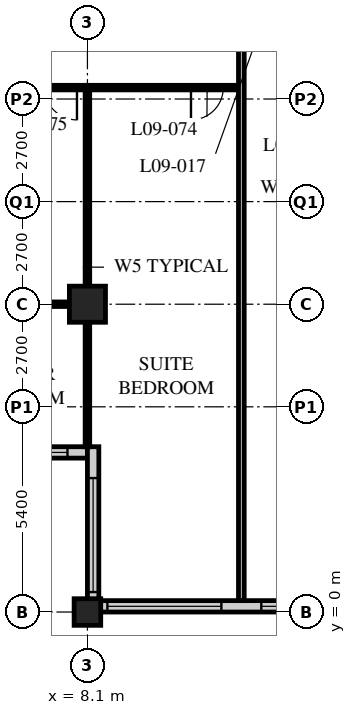
"""IFC4 building model, lengths in metres.
Left out: names, types, materials, properties, quantities, classifications, styles, units other than length and angle.
Written with IfcOpenShell. Run it as: python <this file> out.ifc"""

import sys

from ifc_helpers import new_model, si_unit, direction, frame, frame_2d, origin, origin_2d, place, context, subcontext, project, spatial, rectangle, hollow_rectangle, extrude, element, fill, save


model = new_model("IFC4")
c1 = context("Model", 3, precision=1e-05, world=origin(), true_north=direction((0.0, 1.0)))
c2 = subcontext(c1, "Body", "Model", "MODEL_VIEW")
j1 = project(units=[si_unit("LENGTHUNIT", "METRE"), si_unit("PLANEANGLEUNIT", "RADIAN")], contexts=[c1])
p1 = place(None, origin())
s1 = spatial("IfcSite", under=j1, at=p1, CompositionType="ELEMENT")
p2 = place(p1, origin())
s2 = spatial("IfcBuilding", under=s1, at=p2, CompositionType="ELEMENT")
p3 = place(p2, frame((0.0, 0.0, 43.2)))
s3 = spatial("IfcBuildingStorey", under=s2, at=p3, CompositionType="ELEMENT", Elevation=43.2)
p4 = place(p3, frame((8.1, 0.0, 0.0), z_axis=(0.0, 0.0, 1.0), x_axis=(1.0, 0.0, 0.0)))
e1 = element("IfcColumn", 1, at=p4, inside=s3, PredefinedType="COLUMN", context=c2, shape_type="SweptSolid", body=[
    extrude(hollow_rectangle(XDim=0.7, YDim=0.7, WallThickness=0.06, at=origin_2d()), origin(), (0.0, 0.0, 1.0), 3.4),
])
p5 = place(p3, frame((8.1, 8.1, 0.0), z_axis=(0.0, 0.0, 1.0), x_axis=(1.0, 0.0, 0.0)))
e2 = element("IfcColumn", 2, at=p5, inside=s3, PredefinedType="COLUMN", context=c2, shape_type="SweptSolid", body=[
    extrude(hollow_rectangle(XDim=0.95, YDim=0.95, WallThickness=0.095, at=origin_2d()), origin(), (0.0, 0.0, 1.0), 3.4),
])
p6 = place(p3, frame((8.4, 0.15, 0.0), z_axis=(0.0, 0.0, 1.0), x_axis=(1.0, 0.0, 0.0)))
e3 = element("IfcWall", 3, at=p6, inside=s3, PredefinedType="SOLIDWALL", context=c2, shape_type="SweptSolid", body=[
    extrude(rectangle(XDim=40.2, YDim=0.3, at=frame_2d((20.1, 0.0))), origin(), (0.0, 0.0, 1.0), 3.19),
])
p7 = place(p6, frame((0.225, 0.0, 0.9)))
e4 = element("IfcOpeningElement", 4, at=p7, cuts=e3, PredefinedType="OPENING", context=c2, shape_type="SweptSolid", body=[
    extrude(rectangle(XDim=3.0, YDim=2.0, at=frame_2d((1.5, 1.0))), frame((0.0, 0.16, 0.0), z_axis=(0.0, -1.0, 0.0), x_axis=(1.0, 0.0, 0.0)), (0.0, 0.0, 1.0), 0.32),
])
p8 = place(p6, frame((4.275, 0.0, 0.9)))
e5 = element("IfcOpeningElement", 5, at=p8, cuts=e3, PredefinedType="OPENING", context=c2, shape_type="SweptSolid", body=[
    extrude(rectangle(XDim=3.0, YDim=2.0, at=frame_2d((1.5, 1.0))), frame((0.0, 0.16, 0.0), z_axis=(0.0, -1.0, 0.0), x_axis=(1.0, 0.0, 0.0)), (0.0, 0.0, 1.0), 0.32),
])
p9 = place(p6, frame((8.325, 0.0, 0.9)))
e6 = element("IfcOpeningElement", 6, at=p9, cuts=e3, PredefinedType="OPENING", context=c2, shape_type="SweptSolid", body=[
    extrude(rectangle(XDim=3.0, YDim=2.0, at=frame_2d((1.5, 1.0))), frame((0.0, 0.16, 0.0), z_axis=(0.0, -1.0, 0.0), x_axis=(1.0, 0.0, 0.0)), (0.0, 0.0, 1.0), 0.32),
])
p10 = place(p6, frame((12.375, 0.0, 0.9)))
e7 = element("IfcOpeningElement", 7, at=p10, cuts=e3, PredefinedType="OPENING", context=c2, shape_type="SweptSolid", body=[
    extrude(rectangle(XDim=3.0, YDim=2.0, at=frame_2d((1.5, 1.0))), frame((0.0, 0.16, 0.0), z_axis=(0.0, -1.0, 0.0), x_axis=(1.0, 0.0, 0.0)), (0.0, 0.0, 1.0), 0.32),
])
p11 = place(p6, frame((16.425, 0.0, 0.9)))
e8 = element("IfcOpeningElement", 8, at=p11, cuts=e3, PredefinedType="OPENING", context=c2, shape_type="SweptSolid", body=[
    extrude(rectangle(XDim=3.0, YDim=2.0, at=frame_2d((1.5, 1.0))), frame((0.0, 0.16, 0.0), z_axis=(0.0, -1.0, 0.0), x_axis=(1.0, 0.0, 0.0)), (0.0, 0.0, 1.0), 0.32),
])
p12 = place(p6, frame((20.475, 0.0, 0.9)))
e9 = element("IfcOpeningElement", 9, at=p12, cuts=e3, PredefinedType="OPENING", context=c2, shape_type="SweptSolid", body=[
    extrude(rectangle(XDim=3.0, YDim=2.0, at=frame_2d((1.5, 1.0))), frame((0.0, 0.16, 0.0), z_axis=(0.0, -1.0, 0.0), x_axis=(1.0, 0.0, 0.0)), (0.0, 0.0, 1.0), 0.32),
])
p13 = place(p6, frame((24.525, 0.0, 0.9)))
e10 = element("IfcOpeningElement", 10, at=p13, cuts=e3, PredefinedType="OPENING", context=c2, shape_type="SweptSolid", body=[
    extrude(rectangle(XDim=3.0, YDim=2.0, at=frame_2d((1.5, 1.0))), frame((0.0, 0.16, 0.0), z_axis=(0.0, -1.0, 0.0), x_axis=(1.0, 0.0, 0.0)), (0.0, 0.0, 1.0), 0.32),
])
p14 = place(p6, frame((28.575, 0.0, 0.9)))
e11 = element("IfcOpeningElement", 11, at=p14, cuts=e3, PredefinedType="OPENING", context=c2, shape_type="SweptSolid", body=[
    extrude(rectangle(XDim=3.0, YDim=2.0, at=frame_2d((1.5, 1.0))), frame((0.0, 0.16, 0.0), z_axis=(0.0, -1.0, 0.0), x_axis=(1.0, 0.0, 0.0)), (0.0, 0.0, 1.0), 0.32),
])
p15 = place(p6, frame((32.625, 0.0, 0.9)))
e12 = element("IfcOpeningElement", 12, at=p15, cuts=e3, PredefinedType="OPENING", context=c2, shape_type="SweptSolid", body=[
    extrude(rectangle(XDim=3.0, YDim=2.0, at=frame_2d((1.5, 1.0))), frame((0.0, 0.16, 0.0), z_axis=(0.0, -1.0, 0.0), x_axis=(1.0, 0.0, 0.0)), (0.0, 0.0, 1.0), 0.32),
])
p16 = place(p6, frame((36.675, 0.0, 0.9)))
e13 = element("IfcOpeningElement", 13, at=p16, cuts=e3, PredefinedType="OPENING", context=c2, shape_type="SweptSolid", body=[
    extrude(rectangle(XDim=3.0, YDim=2.0, at=frame_2d((1.5, 1.0))), frame((0.0, 0.16, 0.0), z_axis=(0.0, -1.0, 0.0), x_axis=(1.0, 0.0, 0.0)), (0.0, 0.0, 1.0), 0.32),
])
p17 = place(p3, frame((4.35, 4.2, 0.0), z_axis=(0.0, 0.0, 1.0), x_axis=(1.0, 0.0, 0.0)))
e14 = element("IfcWall", 14, at=p17, inside=s3, PredefinedType="SOLIDWALL", context=c2, shape_type="SweptSolid", body=[
    extrude(rectangle(XDim=3.75, YDim=0.3, at=frame_2d((1.875, 0.0))), origin(), (0.0, 0.0, 1.0), 3.19),
])
p18 = place(p17, frame((0.225, 0.0, 0.9)))
e15 = element("IfcOpeningElement", 15, at=p18, cuts=e14, PredefinedType="OPENING", context=c2, shape_type="SweptSolid", body=[
    extrude(rectangle(XDim=3.0, YDim=1.5, at=frame_2d((1.5, 0.75))), frame((0.0, 0.16, 0.0), z_axis=(0.0, -1.0, 0.0), x_axis=(1.0, 0.0, 0.0)), (0.0, 0.0, 1.0), 0.32),
])
p19 = place(p3, frame((8.25, 4.35, 0.0), z_axis=(0.0, 0.0, 1.0), x_axis=(0.0, -1.0, 0.0)))
e16 = element("IfcWall", 16, at=p19, inside=s3, PredefinedType="SOLIDWALL", context=c2, shape_type="SweptSolid", body=[
    extrude(rectangle(XDim=4.35, YDim=0.3, at=frame_2d((2.175, 0.0))), origin(), (0.0, 0.0, 1.0), 3.19),
])
p20 = place(p19, frame((0.825, 0.0, 0.9)))
e17 = element("IfcOpeningElement", 17, at=p20, cuts=e16, PredefinedType="OPENING", context=c2, shape_type="SweptSolid", body=[
    extrude(rectangle(XDim=3.0, YDim=1.5, at=frame_2d((1.5, 0.75))), frame((0.0, 0.16, 0.0), z_axis=(0.0, -1.0, 0.0), x_axis=(1.0, 0.0, 0.0)), (0.0, 0.0, 1.0), 0.32),
])
p21 = place(p3, frame((4.1, 13.8, 0.0), z_axis=(0.0, 0.0, 1.0), x_axis=(1.0, 0.0, 0.0)))
e18 = element("IfcWall", 18, at=p21, inside=s3, PredefinedType="PARTITIONING", context=c2, shape_type="SweptSolid", body=[
    extrude(rectangle(XDim=8.05, YDim=0.12, at=frame_2d((4.025, 0.0))), origin(), (0.0, 0.0, 1.0), 3.19),
])
p22 = place(p21, frame((6.725, 0.0, 0.0)))
e19 = element("IfcOpeningElement", 19, at=p22, cuts=e18, PredefinedType="OPENING", context=c2, shape_type="SweptSolid", body=[
    extrude(rectangle(XDim=0.85, YDim=2.1, at=frame_2d((0.425, 1.05))), frame((0.0, 0.07, 0.0), z_axis=(0.0, -1.0, 0.0), x_axis=(1.0, 0.0, 0.0)), (0.0, 0.0, 1.0), 0.14),
])
p23 = place(p21, frame((2.875, 0.0, 0.0)))
e20 = element("IfcOpeningElement", 20, at=p23, cuts=e18, PredefinedType="OPENING", context=c2, shape_type="SweptSolid", body=[
    extrude(rectangle(XDim=0.85, YDim=2.1, at=frame_2d((0.425, 1.05))), frame((0.0, 0.07, 0.0), z_axis=(0.0, -1.0, 0.0), x_axis=(1.0, 0.0, 0.0)), (0.0, 0.0, 1.0), 0.14),
])
p24 = place(p3, frame((8.1, 13.8, 0.0), z_axis=(0.0, 0.0, 1.0), x_axis=(0.0, -1.0, 0.0)))
e21 = element("IfcWall", 21, at=p24, inside=s3, PredefinedType="PARTITIONING", context=c2, shape_type="SweptSolid", body=[
    extrude(rectangle(XDim=9.45, YDim=0.12, at=frame_2d((4.725, 0.0))), origin(), (0.0, 0.0, 1.0), 2.578),
])
p25 = place(p3, frame((8.1, 8.1, 0.0), z_axis=(0.0, 0.0, 1.0), x_axis=(-1.0, 0.0, 0.0)))
e22 = element("IfcWall", 22, at=p25, inside=s3, PredefinedType="PARTITIONING", context=c2, shape_type="SweptSolid", body=[
    extrude(rectangle(XDim=3.75, YDim=0.12, at=frame_2d((1.875, 0.0))), origin(), (0.0, 0.0, 1.0), 2.578),
])
p26 = place(p25, frame((1.875, 0.0, 0.0)))
e23 = element("IfcOpeningElement", 23, at=p26, cuts=e22, PredefinedType="OPENING", context=c2, shape_type="SweptSolid", body=[
    extrude(rectangle(XDim=0.85, YDim=2.1, at=frame_2d((0.425, 1.05))), frame((0.0, 0.07, 0.0), z_axis=(0.0, -1.0, 0.0), x_axis=(1.0, 0.0, 0.0)), (0.0, 0.0, 1.0), 0.14),
])
p27 = place(p3, frame((12.15, 16.2, 0.0), z_axis=(0.0, 0.0, 1.0), x_axis=(0.0, -1.0, 0.0)))
e24 = element("IfcWall", 24, at=p27, inside=s3, PredefinedType="PARTITIONING", context=c2, shape_type="SweptSolid", body=[
    extrude(rectangle(XDim=15.9, YDim=0.15, at=frame_2d((7.95, 0.0))), origin(), (0.0, 0.0, 1.0), 3.19),
])
p28 = place(p7, origin())
e25 = element("IfcWindow", 25, at=p28, inside=s3, PartitioningType="SINGLE_PANEL", PredefinedType="WINDOW", context=c2, shape_type="SweptSolid", body=[
    extrude(rectangle(XDim=3.0, YDim=2.0, at=frame_2d((1.5, 1.0))), frame((0.0, 0.03, 0.0), z_axis=(0.0, -1.0, 0.0), x_axis=(1.0, 0.0, 0.0)), (0.0, 0.0, 1.0), 0.06),
])
fill(e4, e25)
p29 = place(p8, origin())
e26 = element("IfcWindow", 26, at=p29, inside=s3, PartitioningType="SINGLE_PANEL", PredefinedType="WINDOW", context=c2, shape_type="SweptSolid", body=[
    extrude(rectangle(XDim=3.0, YDim=2.0, at=frame_2d((1.5, 1.0))), frame((0.0, 0.03, 0.0), z_axis=(0.0, -1.0, 0.0), x_axis=(1.0, 0.0, 0.0)), (0.0, 0.0, 1.0), 0.06),
])
fill(e5, e26)
p30 = place(p18, origin())
e27 = element("IfcWindow", 27, at=p30, inside=s3, PartitioningType="SINGLE_PANEL", PredefinedType="WINDOW", context=c2, shape_type="SweptSolid", body=[
    extrude(rectangle(XDim=3.0, YDim=1.5, at=frame_2d((1.5, 0.75))), frame((0.0, 0.03, 0.0), z_axis=(0.0, -1.0, 0.0), x_axis=(1.0, 0.0, 0.0)), (0.0, 0.0, 1.0), 0.06),
])
fill(e15, e27)
p31 = place(p20, origin())
e28 = element("IfcWindow", 28, at=p31, inside=s3, PartitioningType="SINGLE_PANEL", PredefinedType="WINDOW", context=c2, shape_type="SweptSolid", body=[
    extrude(rectangle(XDim=3.0, YDim=1.5, at=frame_2d((1.5, 0.75))), frame((0.0, 0.03, 0.0), z_axis=(0.0, -1.0, 0.0), x_axis=(1.0, 0.0, 0.0)), (0.0, 0.0, 1.0), 0.06),
])
fill(e17, e28)
p32 = place(p22, origin())
e29 = element("IfcDoor", 29, at=p32, inside=s3, OperationType="SINGLE_SWING_RIGHT", PredefinedType="DOOR", context=c2, shape_type="SweptSolid", body=[
    extrude(rectangle(XDim=0.85, YDim=2.1, at=frame_2d((0.425, 1.05))), frame((0.0, 0.025, 0.0), z_axis=(0.0, -1.0, 0.0), x_axis=(1.0, 0.0, 0.0)), (0.0, 0.0, 1.0), 0.05),
])
fill(e19, e29)
p33 = place(p23, origin())
e30 = element("IfcDoor", 30, at=p33, inside=s3, OperationType="SINGLE_SWING_LEFT", PredefinedType="DOOR", context=c2, shape_type="SweptSolid", body=[
    extrude(rectangle(XDim=0.85, YDim=2.1, at=frame_2d((0.425, 1.05))), frame((0.0, 0.025, 0.0), z_axis=(0.0, -1.0, 0.0), x_axis=(1.0, 0.0, 0.0)), (0.0, 0.0, 1.0), 0.05),
])
fill(e20, e30)
save(model, sys.argv[1])
